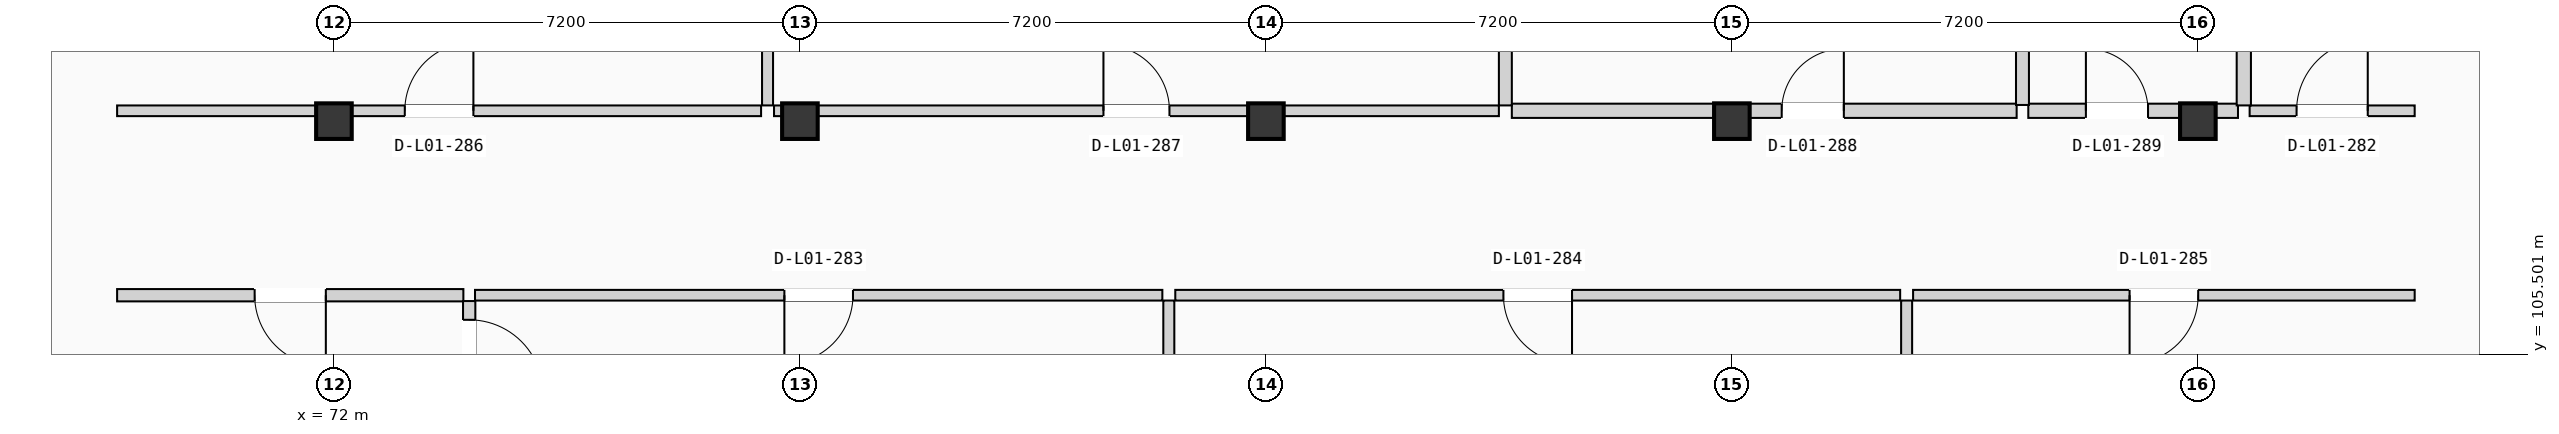
"""IFC4 building model, lengths in metres.
Left out: names, types, materials, properties, quantities, classifications, styles, units other than length and angle.
Written with IfcOpenShell. Run it as: python <this file> out.ifc"""

import sys

from ifc_helpers import new_model, si_unit, direction, frame, frame_2d, origin, origin_2d, place, context, subcontext, project, spatial, rectangle, extrude, element, fill, save


model = new_model("IFC4")
c1 = context("Model", 3, precision=1e-05, world=origin(), true_north=direction((0.0, 1.0)))
c2 = subcontext(c1, "Body", "Model", "MODEL_VIEW")
j1 = project(units=[si_unit("LENGTHUNIT", "METRE"), si_unit("PLANEANGLEUNIT", "RADIAN")], contexts=[c1])
p1 = place(None, origin())
s1 = spatial("IfcSite", under=j1, at=p1, CompositionType="ELEMENT")
p2 = place(p1, origin())
s2 = spatial("IfcBuilding", under=s1, at=p2, CompositionType="ELEMENT")
p3 = place(p2, frame((0.0, 0.0, 4.9)))
s3 = spatial("IfcBuildingStorey", under=s2, at=p3, CompositionType="ELEMENT", Elevation=4.9)
for number, where, z_axis, x_axis in (
    (1, (72.0, 109.1, 0.0), (0.0, 0.0, 1.0), (1.0, 0.0, 0.0)),
    (2, (79.2, 109.1, 0.0), (0.0, 0.0, 1.0), (1.0, 0.0, 0.0)),
    (3, (86.4, 109.1, 0.0), (0.0, 0.0, 1.0), (1.0, 0.0, 0.0)),
    (4, (93.6, 109.1, 0.0), (0.0, 0.0, 1.0), (1.0, 0.0, 0.0)),
    (5, (100.8, 109.1, 0.0), (0.0, 0.0, 1.0), (1.0, 0.0, 0.0)),
):
    element("IfcColumn", number, at=place(p3, frame(where, z_axis=z_axis, x_axis=x_axis)), inside=s3, PredefinedType="COLUMN", context=c2, shape_type="SweptSolid", body=[
        extrude(rectangle(XDim=0.55, YDim=0.55, at=origin_2d()), origin(), (0.0, 0.0, 1.0), 3.675),
    ])
p4 = place(p3, frame((68.65, 106.41, 0.0), z_axis=(0.0, 0.0, 1.0), x_axis=(1.0, 0.0, 0.0)))
e6 = element("IfcWall", 6, at=p4, inside=s3, PredefinedType="PARTITIONING", context=c2, shape_type="SweptSolid", body=[
    extrude(rectangle(XDim=5.35, YDim=0.19, at=frame_2d((2.675, 0.0))), origin(), (0.0, 0.0, 1.0), 2.84),
])
p5 = place(p4, frame((2.125, 0.0, 0.0)))
e7 = element("IfcOpeningElement", 7, at=p5, cuts=e6, PredefinedType="OPENING", context=c2, shape_type="SweptSolid", body=[
    extrude(rectangle(XDim=1.1, YDim=2.12, at=frame_2d((0.55, 1.06))), frame((0.0, 0.105, 0.0), z_axis=(0.0, -1.0, 0.0), x_axis=(1.0, 0.0, 0.0)), (0.0, 0.0, 1.0), 0.21),
])
p6 = place(p3, frame((74.09, 104.6, 0.0), z_axis=(0.0, 0.0, 1.0), x_axis=(0.0, 1.0, 0.0)))
e8 = element("IfcWall", 8, at=p6, inside=s3, PredefinedType="PARTITIONING", context=c2, shape_type="SweptSolid", body=[
    extrude(rectangle(XDim=1.72, YDim=0.19, at=frame_2d((0.86, 0.0))), origin(), (0.0, 0.0, 1.0), 2.84),
])
p7 = place(p6, frame((0.29, 0.0, 0.0)))
e9 = element("IfcOpeningElement", 9, at=p7, cuts=e8, PredefinedType="OPENING", context=c2, shape_type="SweptSolid", body=[
    extrude(rectangle(XDim=1.14, YDim=2.18, at=frame_2d((0.57, 1.09))), frame((0.0, 0.105, 0.0), z_axis=(0.0, -1.0, 0.0), x_axis=(1.0, 0.0, 0.0)), (0.0, 0.0, 1.0), 0.21),
])
p8 = place(p3, frame((101.6, 109.26, 0.0), z_axis=(0.0, 0.0, 1.0), x_axis=(1.0, 0.0, 0.0)))
e10 = element("IfcWall", 10, at=p8, inside=s3, PredefinedType="PARTITIONING", context=c2, shape_type="SweptSolid", body=[
    extrude(rectangle(XDim=2.55, YDim=0.165, at=frame_2d((1.275, 0.0))), origin(), (0.0, 0.0, 1.0), 2.725),
])
p9 = place(p8, frame((0.725, 0.0, 0.0)))
e11 = element("IfcOpeningElement", 11, at=p9, cuts=e10, PredefinedType="OPENING", context=c2, shape_type="SweptSolid", body=[
    extrude(rectangle(XDim=1.1, YDim=2.12, at=frame_2d((0.55, 1.06))), frame((0.0, 0.093, 0.0), z_axis=(0.0, -1.0, 0.0), x_axis=(1.0, 0.0, 0.0)), (0.0, 0.0, 1.0), 0.185),
])
p10 = place(p3, frame((74.18, 106.41, 0.0), z_axis=(0.0, 0.0, 1.0), x_axis=(1.0, 0.0, 0.0)))
e12 = element("IfcWall", 12, at=p10, inside=s3, PredefinedType="PARTITIONING", context=c2, shape_type="SweptSolid", body=[
    extrude(rectangle(XDim=10.62, YDim=0.165, at=frame_2d((5.31, 0.0))), origin(), (0.0, 0.0, 1.0), 2.84),
])
p11 = place(p10, frame((4.78, 0.0, 0.0)))
e13 = element("IfcOpeningElement", 13, at=p11, cuts=e12, PredefinedType="OPENING", context=c2, shape_type="SweptSolid", body=[
    extrude(rectangle(XDim=1.06, YDim=2.14, at=frame_2d((0.53, 1.07))), frame((0.0, 0.093, 0.0), z_axis=(0.0, -1.0, 0.0), x_axis=(1.0, 0.0, 0.0)), (0.0, 0.0, 1.0), 0.185),
])
p12 = place(p3, frame((85.0, 106.41, 0.0), z_axis=(0.0, 0.0, 1.0), x_axis=(1.0, 0.0, 0.0)))
e14 = element("IfcWall", 14, at=p12, inside=s3, PredefinedType="PARTITIONING", context=c2, shape_type="SweptSolid", body=[
    extrude(rectangle(XDim=11.2, YDim=0.165, at=frame_2d((5.6, 0.0))), origin(), (0.0, 0.0, 1.0), 2.84),
])
p13 = place(p12, frame((5.07, 0.0, 0.0)))
e15 = element("IfcOpeningElement", 15, at=p13, cuts=e14, PredefinedType="OPENING", context=c2, shape_type="SweptSolid", body=[
    extrude(rectangle(XDim=1.06, YDim=2.14, at=frame_2d((0.53, 1.07))), frame((0.0, 0.093, 0.0), z_axis=(0.0, -1.0, 0.0), x_axis=(1.0, 0.0, 0.0)), (0.0, 0.0, 1.0), 0.185),
])
p14 = place(p3, frame((96.4, 106.41, 0.0), z_axis=(0.0, 0.0, 1.0), x_axis=(1.0, 0.0, 0.0)))
e16 = element("IfcWall", 16, at=p14, inside=s3, PredefinedType="PARTITIONING", context=c2, shape_type="SweptSolid", body=[
    extrude(rectangle(XDim=7.75, YDim=0.165, at=frame_2d((3.875, 0.0))), origin(), (0.0, 0.0, 1.0), 2.84),
])
p15 = place(p14, frame((3.345, 0.0, 0.0)))
e17 = element("IfcOpeningElement", 17, at=p15, cuts=e16, PredefinedType="OPENING", context=c2, shape_type="SweptSolid", body=[
    extrude(rectangle(XDim=1.06, YDim=2.14, at=frame_2d((0.53, 1.07))), frame((0.0, 0.093, 0.0), z_axis=(0.0, -1.0, 0.0), x_axis=(1.0, 0.0, 0.0)), (0.0, 0.0, 1.0), 0.185),
])
p16 = place(p3, frame((68.65, 109.26, 0.0), z_axis=(0.0, 0.0, 1.0), x_axis=(1.0, 0.0, 0.0)))
e18 = element("IfcWall", 18, at=p16, inside=s3, PredefinedType="PARTITIONING", context=c2, shape_type="SweptSolid", body=[
    extrude(rectangle(XDim=9.95, YDim=0.165, at=frame_2d((4.975, 0.0))), origin(), (0.0, 0.0, 1.0), 2.725),
])
p17 = place(p16, frame((4.445, 0.0, 0.0)))
e19 = element("IfcOpeningElement", 19, at=p17, cuts=e18, PredefinedType="OPENING", context=c2, shape_type="SweptSolid", body=[
    extrude(rectangle(XDim=1.06, YDim=2.14, at=frame_2d((0.53, 1.07))), frame((0.0, 0.093, 0.0), z_axis=(0.0, -1.0, 0.0), x_axis=(1.0, 0.0, 0.0)), (0.0, 0.0, 1.0), 0.185),
])
p18 = place(p3, frame((78.8, 109.26, 0.0), z_axis=(0.0, 0.0, 1.0), x_axis=(1.0, 0.0, 0.0)))
e20 = element("IfcWall", 20, at=p18, inside=s3, PredefinedType="PARTITIONING", context=c2, shape_type="SweptSolid", body=[
    extrude(rectangle(XDim=11.2, YDim=0.165, at=frame_2d((5.6, 0.0))), origin(), (0.0, 0.0, 1.0), 2.725),
])
p19 = place(p18, frame((5.09, 0.0, 0.0)))
e21 = element("IfcOpeningElement", 21, at=p19, cuts=e20, PredefinedType="OPENING", context=c2, shape_type="SweptSolid", body=[
    extrude(rectangle(XDim=1.02, YDim=2.16, at=frame_2d((0.51, 1.08))), frame((0.0, 0.093, 0.0), z_axis=(0.0, -1.0, 0.0), x_axis=(1.0, 0.0, 0.0)), (0.0, 0.0, 1.0), 0.185),
])
p20 = place(p3, frame((90.2, 109.26, 0.0), z_axis=(0.0, 0.0, 1.0), x_axis=(1.0, 0.0, 0.0)))
e22 = element("IfcWall", 22, at=p20, inside=s3, PredefinedType="PLUMBINGWALL", context=c2, shape_type="SweptSolid", body=[
    extrude(rectangle(XDim=7.8, YDim=0.22, at=frame_2d((3.9, 0.0))), origin(), (0.0, 0.0, 1.0), 2.725),
])
p21 = place(p20, frame((4.17, 0.0, 0.0)))
e23 = element("IfcOpeningElement", 23, at=p21, cuts=e22, PredefinedType="OPENING", context=c2, shape_type="SweptSolid", body=[
    extrude(rectangle(XDim=0.96, YDim=2.05, at=frame_2d((0.48, 1.025))), frame((0.0, 0.12, 0.0), z_axis=(0.0, -1.0, 0.0), x_axis=(1.0, 0.0, 0.0)), (0.0, 0.0, 1.0), 0.24),
])
p22 = place(p3, frame((98.18, 109.26, 0.0), z_axis=(0.0, 0.0, 1.0), x_axis=(1.0, 0.0, 0.0)))
e24 = element("IfcWall", 24, at=p22, inside=s3, PredefinedType="PLUMBINGWALL", context=c2, shape_type="SweptSolid", body=[
    extrude(rectangle(XDim=3.24, YDim=0.22, at=frame_2d((1.62, 0.0))), origin(), (0.0, 0.0, 1.0), 2.725),
])
p23 = place(p22, frame((0.89, 0.0, 0.0)))
e25 = element("IfcOpeningElement", 25, at=p23, cuts=e24, PredefinedType="OPENING", context=c2, shape_type="SweptSolid", body=[
    extrude(rectangle(XDim=0.96, YDim=2.05, at=frame_2d((0.48, 1.025))), frame((0.0, 0.12, 0.0), z_axis=(0.0, -1.0, 0.0), x_axis=(1.0, 0.0, 0.0)), (0.0, 0.0, 1.0), 0.24),
])
p24 = place(p3, frame((101.51, 109.343, 0.0), z_axis=(0.0, 0.0, 1.0), x_axis=(0.0, 1.0, 0.0)))
e26 = element("IfcWall", 26, at=p24, inside=s3, PredefinedType="PLUMBINGWALL", context=c2, shape_type="SweptSolid", body=[
    extrude(rectangle(XDim=9.137, YDim=0.22, at=frame_2d((4.568, 0.0))), origin(), (0.0, 0.0, 1.0), 2.84),
])
p25 = place(p24, frame((4.092, 0.0, 0.0)))
e27 = element("IfcOpeningElement", 27, at=p25, cuts=e26, PredefinedType="OPENING", context=c2, shape_type="SweptSolid", body=[
    extrude(rectangle(XDim=0.96, YDim=2.05, at=frame_2d((0.48, 1.025))), frame((0.0, 0.12, 0.0), z_axis=(0.0, -1.0, 0.0), x_axis=(1.0, 0.0, 0.0)), (0.0, 0.0, 1.0), 0.24),
])
for number, where, z_axis, x_axis in (
    (28, (84.9, 97.52, 0.0), (0.0, 0.0, 1.0), (0.0, 1.0, 0.0)),
    (29, (96.3, 97.52, 0.0), (0.0, 0.0, 1.0), (0.0, 1.0, 0.0)),
):
    element("IfcWall", number, at=place(p3, frame(where, z_axis=z_axis, x_axis=x_axis)), inside=s3, PredefinedType="PARTITIONING", context=c2, shape_type="SweptSolid", body=[
        extrude(rectangle(XDim=8.808, YDim=0.17, at=frame_2d((4.404, 0.0))), origin(), (0.0, 0.0, 1.0), 2.84),
    ])
p26 = place(p3, frame((78.7, 109.343, 0.0), z_axis=(0.0, 0.0, 1.0), x_axis=(0.0, 1.0, 0.0)))
e30 = element("IfcWall", 30, at=p26, inside=s3, PredefinedType="PARTITIONING", context=c2, shape_type="SweptSolid", body=[
    extrude(rectangle(XDim=9.137, YDim=0.17, at=frame_2d((4.568, 0.0))), origin(), (0.0, 0.0, 1.0), 2.84),
])
p27 = place(p3, frame((90.1, 109.343, 0.0), z_axis=(0.0, 0.0, 1.0), x_axis=(0.0, 1.0, 0.0)))
e31 = element("IfcWall", 31, at=p27, inside=s3, PredefinedType="PLUMBINGWALL", context=c2, shape_type="SweptSolid", body=[
    extrude(rectangle(XDim=9.137, YDim=0.2, at=frame_2d((4.568, 0.0))), origin(), (0.0, 0.0, 1.0), 2.84),
])
p28 = place(p3, frame((98.09, 109.35, 0.0), z_axis=(0.0, 0.0, 1.0), x_axis=(0.0, 1.0, 0.0)))
e32 = element("IfcWall", 32, at=p28, inside=s3, PredefinedType="PLUMBINGWALL", context=c2, shape_type="SweptSolid", body=[
    extrude(rectangle(XDim=9.13, YDim=0.2, at=frame_2d((4.565, 0.0))), origin(), (0.0, 0.0, 1.0), 2.84),
])
p29 = place(p5, frame((1.1, 0.0, 0.0), z_axis=(0.0, 0.0, 1.0), x_axis=(-1.0, 0.0, 0.0)))
e33 = element("IfcDoor", 33, at=p29, inside=s3, OperationType="SINGLE_SWING_RIGHT", PredefinedType="DOOR", context=c2, shape_type="SweptSolid", body=[
    extrude(rectangle(XDim=1.1, YDim=2.12, at=frame_2d((0.55, 1.06))), frame((0.0, 0.025, 0.0), z_axis=(0.0, -1.0, 0.0), x_axis=(1.0, 0.0, 0.0)), (0.0, 0.0, 1.0), 0.05),
])
fill(e7, e33)
p30 = place(p7, frame((1.14, 0.0, 0.0), z_axis=(0.0, 0.0, 1.0), x_axis=(-1.0, 0.0, 0.0)))
e34 = element("IfcDoor", 34, at=p30, inside=s3, OperationType="SINGLE_SWING_LEFT", PredefinedType="DOOR", context=c2, shape_type="SweptSolid", body=[
    extrude(rectangle(XDim=1.14, YDim=2.18, at=frame_2d((0.57, 1.09))), frame((0.0, 0.025, 0.0), z_axis=(0.0, -1.0, 0.0), x_axis=(1.0, 0.0, 0.0)), (0.0, 0.0, 1.0), 0.05),
])
fill(e9, e34)
p31 = place(p9, origin())
e35 = element("IfcDoor", 35, at=p31, inside=s3, OperationType="SINGLE_SWING_RIGHT", PredefinedType="DOOR", context=c2, shape_type="SweptSolid", body=[
    extrude(rectangle(XDim=1.1, YDim=2.12, at=frame_2d((0.55, 1.06))), frame((0.0, 0.025, 0.0), z_axis=(0.0, -1.0, 0.0), x_axis=(1.0, 0.0, 0.0)), (0.0, 0.0, 1.0), 0.05),
])
fill(e11, e35)
p32 = place(p11, frame((1.06, 0.0, 0.0), z_axis=(0.0, 0.0, 1.0), x_axis=(-1.0, 0.0, 0.0)))
e36 = element("IfcDoor", 36, at=p32, inside=s3, OperationType="SINGLE_SWING_LEFT", PredefinedType="DOOR", context=c2, shape_type="SweptSolid", body=[
    extrude(rectangle(XDim=1.06, YDim=2.14, at=frame_2d((0.53, 1.07))), frame((0.0, 0.025, 0.0), z_axis=(0.0, -1.0, 0.0), x_axis=(1.0, 0.0, 0.0)), (0.0, 0.0, 1.0), 0.05),
])
fill(e13, e36)
p33 = place(p13, frame((1.06, 0.0, 0.0), z_axis=(0.0, 0.0, 1.0), x_axis=(-1.0, 0.0, 0.0)))
e37 = element("IfcDoor", 37, at=p33, inside=s3, OperationType="SINGLE_SWING_RIGHT", PredefinedType="DOOR", context=c2, shape_type="SweptSolid", body=[
    extrude(rectangle(XDim=1.06, YDim=2.14, at=frame_2d((0.53, 1.07))), frame((0.0, 0.025, 0.0), z_axis=(0.0, -1.0, 0.0), x_axis=(1.0, 0.0, 0.0)), (0.0, 0.0, 1.0), 0.05),
])
fill(e15, e37)
p34 = place(p15, frame((1.06, 0.0, 0.0), z_axis=(0.0, 0.0, 1.0), x_axis=(-1.0, 0.0, 0.0)))
e38 = element("IfcDoor", 38, at=p34, inside=s3, OperationType="SINGLE_SWING_LEFT", PredefinedType="DOOR", context=c2, shape_type="SweptSolid", body=[
    extrude(rectangle(XDim=1.06, YDim=2.14, at=frame_2d((0.53, 1.07))), frame((0.0, 0.025, 0.0), z_axis=(0.0, -1.0, 0.0), x_axis=(1.0, 0.0, 0.0)), (0.0, 0.0, 1.0), 0.05),
])
fill(e17, e38)
p35 = place(p17, origin())
e39 = element("IfcDoor", 39, at=p35, inside=s3, OperationType="SINGLE_SWING_RIGHT", PredefinedType="DOOR", context=c2, shape_type="SweptSolid", body=[
    extrude(rectangle(XDim=1.06, YDim=2.14, at=frame_2d((0.53, 1.07))), frame((0.0, 0.025, 0.0), z_axis=(0.0, -1.0, 0.0), x_axis=(1.0, 0.0, 0.0)), (0.0, 0.0, 1.0), 0.05),
])
fill(e19, e39)
p36 = place(p19, origin())
e40 = element("IfcDoor", 40, at=p36, inside=s3, OperationType="SINGLE_SWING_LEFT", PredefinedType="DOOR", context=c2, shape_type="SweptSolid", body=[
    extrude(rectangle(XDim=1.02, YDim=2.16, at=frame_2d((0.51, 1.08))), frame((0.0, 0.025, 0.0), z_axis=(0.0, -1.0, 0.0), x_axis=(1.0, 0.0, 0.0)), (0.0, 0.0, 1.0), 0.05),
])
fill(e21, e40)
p37 = place(p21, origin())
e41 = element("IfcDoor", 41, at=p37, inside=s3, OperationType="SINGLE_SWING_RIGHT", PredefinedType="DOOR", context=c2, shape_type="SweptSolid", body=[
    extrude(rectangle(XDim=0.96, YDim=2.05, at=frame_2d((0.48, 1.025))), frame((0.0, 0.025, 0.0), z_axis=(0.0, -1.0, 0.0), x_axis=(1.0, 0.0, 0.0)), (0.0, 0.0, 1.0), 0.05),
])
fill(e23, e41)
p38 = place(p23, origin())
e42 = element("IfcDoor", 42, at=p38, inside=s3, OperationType="SINGLE_SWING_LEFT", PredefinedType="DOOR", context=c2, shape_type="SweptSolid", body=[
    extrude(rectangle(XDim=0.96, YDim=2.05, at=frame_2d((0.48, 1.025))), frame((0.0, 0.025, 0.0), z_axis=(0.0, -1.0, 0.0), x_axis=(1.0, 0.0, 0.0)), (0.0, 0.0, 1.0), 0.05),
])
fill(e25, e42)
save(model, sys.argv[1])
